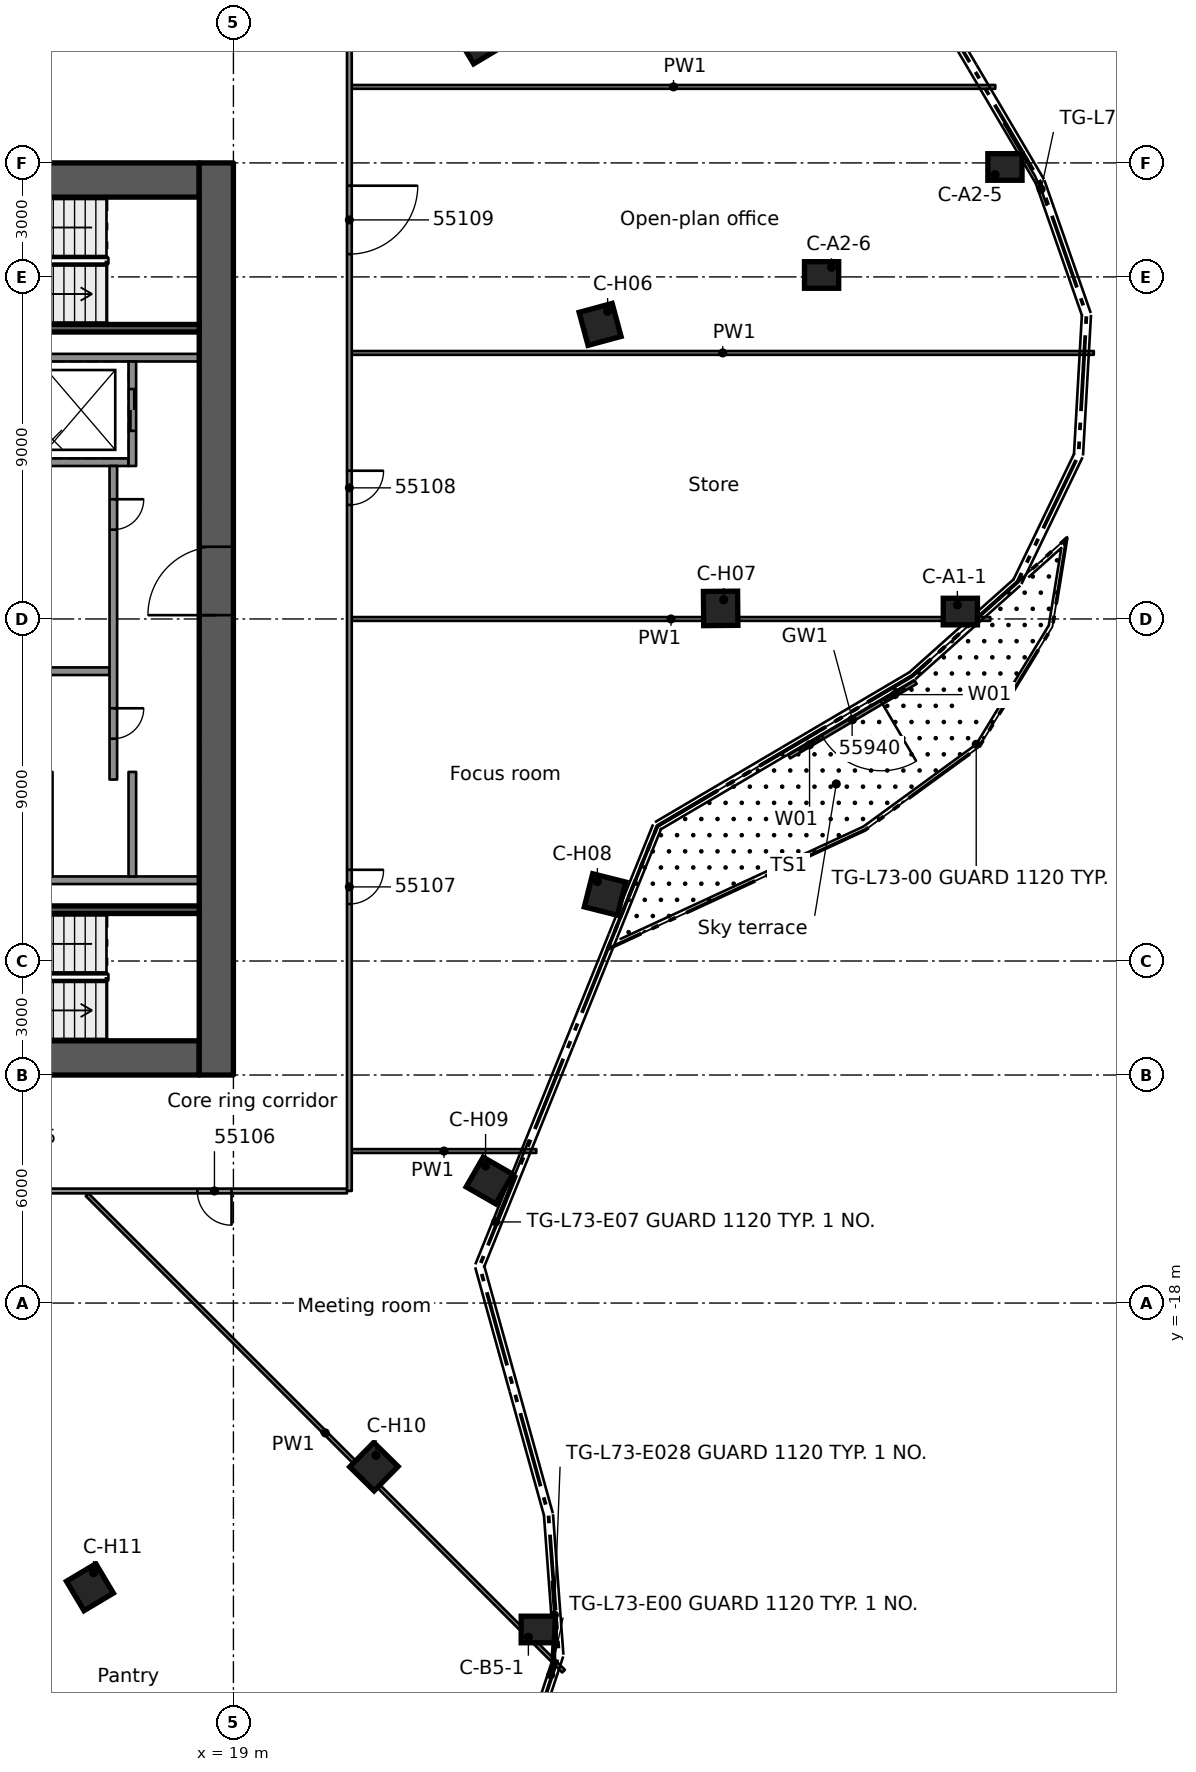
"""IFC4 building model, lengths in metres.
Left out: names, types, materials, properties, quantities, classifications, styles, units other than length and angle.
Written with IfcOpenShell. Run it as: python <this file> out.ifc"""

import sys

from ifc_helpers import new_model, si_unit, direction, frame, frame_2d, origin, origin_2d, place, context, subcontext, project, spatial, rectangle, extrude, element, fill, save


model = new_model("IFC4")
c1 = context("Model", 3, precision=1e-05, world=origin(), true_north=direction((0.0, 1.0)))
c2 = subcontext(c1, "Body", "Model", "MODEL_VIEW")
j1 = project(units=[si_unit("LENGTHUNIT", "METRE"), si_unit("PLANEANGLEUNIT", "RADIAN")], contexts=[c1])
p1 = place(None, origin())
s1 = spatial("IfcSite", under=j1, at=p1, CompositionType="ELEMENT")
p2 = place(p1, origin())
s2 = spatial("IfcBuilding", under=s1, at=p2, CompositionType="ELEMENT")
p3 = place(p2, frame((0.0, 0.0, 275.4)))
s3 = spatial("IfcBuildingStorey", under=s2, at=p3, CompositionType="ELEMENT", Elevation=275.4)
p4 = place(p3, frame((8.9, 11.55, 0.0), z_axis=(0.0, 0.0, 1.0), x_axis=(1.0, 0.0, 0.0)))
e1 = element("IfcWall", 1, at=p4, inside=s3, PredefinedType="SHEAR", context=c2, shape_type="SweptSolid", body=[
    extrude(rectangle(XDim=9.2, YDim=0.9, at=frame_2d((4.6, 0.0))), origin(), (0.0, 0.0, 1.0), 3.5),
])
p5 = place(p4, frame((3.0, 0.0, 0.0)))
e2 = element("IfcOpeningElement", 2, at=p5, cuts=e1, PredefinedType="OPENING", context=c2, shape_type="SweptSolid", body=[
    extrude(rectangle(XDim=1.1, YDim=2.1, at=frame_2d((0.55, 1.05))), frame((0.0, 0.46, 0.0), z_axis=(0.0, -1.0, 0.0), x_axis=(1.0, 0.0, 0.0)), (0.0, 0.0, 1.0), 0.92),
])
p6 = place(p4, frame((0.77, 0.0, 0.0)))
e3 = element("IfcOpeningElement", 3, at=p6, cuts=e1, PredefinedType="OPENING", context=c2, shape_type="SweptSolid", body=[
    extrude(rectangle(XDim=0.9, YDim=2.1, at=frame_2d((0.45, 1.05))), frame((0.0, 0.46, 0.0), z_axis=(0.0, -1.0, 0.0), x_axis=(1.0, 0.0, 0.0)), (0.0, 0.0, 1.0), 0.92),
])
p7 = place(p3, frame((8.9, -11.55, 0.0), z_axis=(0.0, 0.0, 1.0), x_axis=(1.0, 0.0, 0.0)))
e4 = element("IfcWall", 4, at=p7, inside=s3, PredefinedType="SHEAR", context=c2, shape_type="SweptSolid", body=[
    extrude(rectangle(XDim=9.2, YDim=0.9, at=frame_2d((4.6, 0.0))), origin(), (0.0, 0.0, 1.0), 3.5),
])
p8 = place(p7, frame((3.0, 0.0, 0.0)))
e5 = element("IfcOpeningElement", 5, at=p8, cuts=e4, PredefinedType="OPENING", context=c2, shape_type="SweptSolid", body=[
    extrude(rectangle(XDim=1.1, YDim=2.1, at=frame_2d((0.55, 1.05))), frame((0.0, 0.46, 0.0), z_axis=(0.0, -1.0, 0.0), x_axis=(1.0, 0.0, 0.0)), (0.0, 0.0, 1.0), 0.92),
])
p9 = place(p3, frame((18.55, -12.0, 0.0), z_axis=(0.0, 0.0, 1.0), x_axis=(0.0, 1.0, 0.0)))
e6 = element("IfcWall", 6, at=p9, inside=s3, PredefinedType="SHEAR", context=c2, shape_type="SweptSolid", body=[
    extrude(rectangle(XDim=24.0, YDim=0.9, at=frame_2d((12.0, 0.0))), origin(), (0.0, 0.0, 1.0), 3.5),
])
p10 = place(p9, frame((12.1, 0.0, 0.0)))
e7 = element("IfcOpeningElement", 7, at=p10, cuts=e6, PredefinedType="OPENING", context=c2, shape_type="SweptSolid", body=[
    extrude(rectangle(XDim=1.8, YDim=2.1, at=frame_2d((0.9, 1.05))), frame((0.0, 0.46, 0.0), z_axis=(0.0, -1.0, 0.0), x_axis=(1.0, 0.0, 0.0)), (0.0, 0.0, 1.0), 0.92),
])
for number, where, z_axis, x_axis in (
    (8, (38.128, 0.195, 0.0), (0.0, 0.0, 1.0), (1.0, 0.0, 0.0)),
    (9, (39.302, 11.893, 0.0), (0.0, 0.0, 1.0), (1.0, 0.0, 0.0)),
    (10, (34.477, 9.051, 0.0), (0.0, 0.0, 1.0), (1.0, 0.0, 0.0)),
    (11, (27.022, -26.589, 0.0), (0.0, 0.0, 1.0), (1.0, 0.0, 0.0)),
):
    element("IfcColumn", number, at=place(p3, frame(where, z_axis=z_axis, x_axis=x_axis)), inside=s3, PredefinedType="COLUMN", context=c2, shape_type="SweptSolid", body=[
        extrude(rectangle(XDim=0.9, YDim=0.7, at=origin_2d()), origin(), (0.0, 0.0, 1.0), 3.5),
    ])
for number, where, z_axis, x_axis in (
    (12, (25.477, 15.224, 0.0), (0.0, 0.0, 1.0), (0.858, 0.513, 0.0)),
    (13, (28.649, 7.751, 0.0), (0.0, 0.0, 1.0), (0.965, 0.261, 0.0)),
    (14, (31.821, 0.278, 0.0), (0.0, 0.0, 1.0), (1.0, 0.009, 0.0)),
    (15, (28.78, -7.25, 0.0), (0.0, 0.0, 1.0), (0.97, -0.244, 0.0)),
    (16, (25.739, -14.777, 0.0), (0.0, 0.0, 1.0), (0.867, -0.498, 0.0)),
    (17, (22.697, -22.305, 0.0), (0.0, 0.0, 1.0), (0.713, -0.701, 0.0)),
    (18, (15.224, -25.477, 0.0), (0.0, 0.0, 1.0), (0.513, -0.858, 0.0)),
):
    element("IfcColumn", number, at=place(p3, frame(where, z_axis=z_axis, x_axis=x_axis)), inside=s3, PredefinedType="COLUMN", context=c2, shape_type="SweptSolid", body=[
        extrude(rectangle(XDim=0.9, YDim=0.9, at=origin_2d()), origin(), (0.0, 0.0, 1.0), 3.5),
    ])
for number, where, z_axis, x_axis in (
    (19, (11.54, -6.875, 0.0), (0.0, 0.0, 1.0), (1.0, 0.0, 0.0)),
    (20, (11.54, 6.875, 0.0), (0.0, 0.0, 1.0), (1.0, 0.0, 0.0)),
):
    element("IfcWall", number, at=place(p3, frame(where, z_axis=z_axis, x_axis=x_axis)), inside=s3, PredefinedType="SOLIDWALL", context=c2, shape_type="SweptSolid", body=[
        extrude(rectangle(XDim=6.56, YDim=0.2, at=frame_2d((3.28, 0.0))), origin(), (0.0, 0.0, 1.0), 3.09),
    ])
p11 = place(p3, frame((11.54, 4.125, 0.0), z_axis=(0.0, 0.0, 1.0), x_axis=(1.0, 0.0, 0.0)))
e21 = element("IfcWall", 21, at=p11, inside=s3, PredefinedType="SOLIDWALL", context=c2, shape_type="SweptSolid", body=[
    extrude(rectangle(XDim=4.7, YDim=0.2, at=frame_2d((2.35, 0.0))), origin(), (0.0, 0.0, 1.0), 3.09),
])
p12 = place(p3, frame((11.54, -1.375, 0.0), z_axis=(0.0, 0.0, 1.0), x_axis=(1.0, 0.0, 0.0)))
e22 = element("IfcWall", 22, at=p12, inside=s3, PredefinedType="SOLIDWALL", context=c2, shape_type="SweptSolid", body=[
    extrude(rectangle(XDim=4.2, YDim=0.2, at=frame_2d((2.1, 0.0))), origin(), (0.0, 0.0, 1.0), 3.09),
])
p13 = place(p3, frame((14.14, -4.025, 0.0), z_axis=(0.0, 0.0, 1.0), x_axis=(0.0, -1.0, 0.0)))
e23 = element("IfcWall", 23, at=p13, inside=s3, PredefinedType="SOLIDWALL", context=c2, shape_type="SweptSolid", body=[
    extrude(rectangle(XDim=2.75, YDim=0.2, at=frame_2d((1.375, 0.0))), origin(), (0.0, 0.0, 1.0), 3.09),
])
p14 = place(p3, frame((16.34, 6.775, 0.0), z_axis=(0.0, 0.0, 1.0), x_axis=(0.0, -1.0, 0.0)))
e24 = element("IfcWall", 24, at=p14, inside=s3, PredefinedType="SOLIDWALL", context=c2, shape_type="SweptSolid", body=[
    extrude(rectangle(XDim=2.75, YDim=0.2, at=frame_2d((1.375, 0.0))), origin(), (0.0, 0.0, 1.0), 3.09),
])
p15 = place(p14, frame((0.725, 0.0, 0.0)))
e25 = element("IfcOpeningElement", 25, at=p15, cuts=e24, PredefinedType="OPENING", context=c2, shape_type="SweptSolid", body=[
    extrude(rectangle(XDim=1.1, YDim=2.1, at=frame_2d((0.55, 1.05))), frame((0.0, 0.11, 0.0), z_axis=(0.0, -1.0, 0.0), x_axis=(1.0, 0.0, 0.0)), (0.0, 0.0, 1.0), 0.22),
])
p16 = place(p3, frame((15.84, 4.025, 0.0), z_axis=(0.0, 0.0, 1.0), x_axis=(0.0, -1.0, 0.0)))
e26 = element("IfcWall", 26, at=p16, inside=s3, PredefinedType="SOLIDWALL", context=c2, shape_type="SweptSolid", body=[
    extrude(rectangle(XDim=8.25, YDim=0.2, at=frame_2d((4.125, 0.0))), origin(), (0.0, 0.0, 1.0), 3.09),
])
p17 = place(p16, frame((0.875, 0.0, 0.0)))
e27 = element("IfcOpeningElement", 27, at=p17, cuts=e26, PredefinedType="OPENING", context=c2, shape_type="SweptSolid", body=[
    extrude(rectangle(XDim=0.8, YDim=2.1, at=frame_2d((0.4, 1.05))), frame((0.0, 0.11, 0.0), z_axis=(0.0, -1.0, 0.0), x_axis=(1.0, 0.0, 0.0)), (0.0, 0.0, 1.0), 0.22),
])
p18 = place(p16, frame((6.375, 0.0, 0.0)))
e28 = element("IfcOpeningElement", 28, at=p18, cuts=e26, PredefinedType="OPENING", context=c2, shape_type="SweptSolid", body=[
    extrude(rectangle(XDim=0.8, YDim=2.1, at=frame_2d((0.4, 1.05))), frame((0.0, 0.11, 0.0), z_axis=(0.0, -1.0, 0.0), x_axis=(1.0, 0.0, 0.0)), (0.0, 0.0, 1.0), 0.22),
])
p19 = place(p3, frame((16.34, -4.025, 0.0), z_axis=(0.0, 0.0, 1.0), x_axis=(0.0, -1.0, 0.0)))
e29 = element("IfcWall", 29, at=p19, inside=s3, PredefinedType="SOLIDWALL", context=c2, shape_type="SweptSolid", body=[
    extrude(rectangle(XDim=2.75, YDim=0.2, at=frame_2d((1.375, 0.0))), origin(), (0.0, 0.0, 1.0), 3.09),
])
for number, where, z_axis, x_axis in (
    (30, (11.54, -7.65, 0.0), (0.0, 0.0, 1.0), (1.0, 0.0, 0.0)),
    (31, (11.54, 7.65, 0.0), (0.0, 0.0, 1.0), (1.0, 0.0, 0.0)),
):
    element("IfcWall", number, at=place(p3, frame(where, z_axis=z_axis, x_axis=x_axis)), inside=s3, PredefinedType="SOLIDWALL", context=c2, shape_type="SweptSolid", body=[
        extrude(rectangle(XDim=6.56, YDim=0.2, at=frame_2d((3.28, 0.0))), origin(), (0.0, 0.0, 1.0), 3.09),
    ])
p20 = place(p3, frame((36.955, -1.664, 0.0), z_axis=(0.0, 0.0, 1.0), x_axis=(-0.861607547151, -0.507575053261, 0.0)))
e32 = element("IfcWall", 32, at=p20, inside=s3, PredefinedType="STANDARD", context=c2, shape_type="SweptSolid", body=[
    extrude(rectangle(XDim=3.864, YDim=0.1, at=frame_2d((1.932, 0.0))), origin(), (0.0, 0.0, 1.0), 3.1),
])
p21 = place(p20, frame((1.043, 0.0, 0.0)))
e33 = element("IfcOpeningElement", 33, at=p21, cuts=e32, PredefinedType="OPENING", context=c2, shape_type="SweptSolid", body=[
    extrude(rectangle(XDim=1.8, YDim=2.4, at=frame_2d((0.9, 1.2))), frame((0.0, 0.06, 0.0), z_axis=(0.0, -1.0, 0.0), x_axis=(1.0, 0.0, 0.0)), (0.0, 0.0, 1.0), 0.12),
])
p22 = place(p20, frame((0.343, 0.0, 0.0)))
e34 = element("IfcOpeningElement", 34, at=p22, cuts=e32, PredefinedType="OPENING", context=c2, shape_type="SweptSolid", body=[
    extrude(rectangle(XDim=0.6, YDim=2.4, at=frame_2d((0.3, 1.2))), frame((0.0, 0.06, 0.0), z_axis=(0.0, -1.0, 0.0), x_axis=(1.0, 0.0, 0.0)), (0.0, 0.0, 1.0), 0.12),
])
p23 = place(p20, frame((2.943, 0.0, 0.0)))
e35 = element("IfcOpeningElement", 35, at=p23, cuts=e32, PredefinedType="OPENING", context=c2, shape_type="SweptSolid", body=[
    extrude(rectangle(XDim=0.6, YDim=2.4, at=frame_2d((0.3, 1.2))), frame((0.0, 0.06, 0.0), z_axis=(0.0, -1.0, 0.0), x_axis=(1.0, 0.0, 0.0)), (0.0, 0.0, 1.0), 0.12),
])
p24 = place(p3, frame((15.15, -15.149, 0.0), z_axis=(0.0, 0.0, 1.0), x_axis=(0.707106781187, -0.707106781187, 0.0)))
e36 = element("IfcWall", 36, at=p24, inside=s3, PredefinedType="PARTITIONING", context=c2, shape_type="SweptSolid", body=[
    extrude(rectangle(XDim=17.73, YDim=0.1, at=frame_2d((8.865, 0.0))), origin(), (0.0, 0.0, 1.0), 3.08),
])
p25 = place(p3, frame((21.988, -15.051, 0.0), z_axis=(0.0, 0.0, 1.0), x_axis=(-1.0, 0.0, 0.0)))
e37 = element("IfcWall", 37, at=p25, inside=s3, PredefinedType="PARTITIONING", context=c2, shape_type="SweptSolid", body=[
    extrude(rectangle(XDim=11.638, YDim=0.125, at=frame_2d((5.819, 0.0))), origin(), (0.0, 0.0, 1.0), 3.08),
])
p26 = place(p25, frame((8.785, 0.0, 0.0)))
e38 = element("IfcOpeningElement", 38, at=p26, cuts=e37, PredefinedType="OPENING", context=c2, shape_type="SweptSolid", body=[
    extrude(rectangle(XDim=0.9, YDim=2.1, at=frame_2d((0.45, 1.05))), frame((0.0, 0.073, 0.0), z_axis=(0.0, -1.0, 0.0), x_axis=(1.0, 0.0, 0.0)), (0.0, 0.0, 1.0), 0.145),
])
p27 = place(p25, frame((3.038, 0.0, 0.0)))
e39 = element("IfcOpeningElement", 39, at=p27, cuts=e37, PredefinedType="OPENING", context=c2, shape_type="SweptSolid", body=[
    extrude(rectangle(XDim=0.9, YDim=2.1, at=frame_2d((0.45, 1.05))), frame((0.0, 0.073, 0.0), z_axis=(0.0, -1.0, 0.0), x_axis=(1.0, 0.0, 0.0)), (0.0, 0.0, 1.0), 0.145),
])
p28 = place(p3, frame((22.113, -14.0, 0.0), z_axis=(0.0, 0.0, 1.0), x_axis=(1.0, 0.0, 0.0)))
e40 = element("IfcWall", 40, at=p28, inside=s3, PredefinedType="PARTITIONING", context=c2, shape_type="SweptSolid", body=[
    extrude(rectangle(XDim=4.857, YDim=0.1, at=frame_2d((2.428, 0.0))), origin(), (0.0, 0.0, 1.0), 3.08),
])
p29 = place(p3, frame((22.113, 0.0, 0.0), z_axis=(0.0, 0.0, 1.0), x_axis=(1.0, 0.0, 0.0)))
e41 = element("IfcWall", 41, at=p29, inside=s3, PredefinedType="PARTITIONING", context=c2, shape_type="SweptSolid", body=[
    extrude(rectangle(XDim=16.803, YDim=0.1, at=frame_2d((8.401, 0.0))), origin(), (0.0, 0.0, 1.0), 3.08),
])
p30 = place(p3, frame((22.113, 7.0, 0.0), z_axis=(0.0, 0.0, 1.0), x_axis=(1.0, 0.0, 0.0)))
e42 = element("IfcWall", 42, at=p30, inside=s3, PredefinedType="PARTITIONING", context=c2, shape_type="SweptSolid", body=[
    extrude(rectangle(XDim=19.527, YDim=0.1, at=frame_2d((9.763, 0.0))), origin(), (0.0, 0.0, 1.0), 3.08),
])
p31 = place(p3, frame((22.113, 14.0, 0.0), z_axis=(0.0, 0.0, 1.0), x_axis=(1.0, 0.0, 0.0)))
e43 = element("IfcWall", 43, at=p31, inside=s3, PredefinedType="PARTITIONING", context=c2, shape_type="SweptSolid", body=[
    extrude(rectangle(XDim=16.935, YDim=0.1, at=frame_2d((8.468, 0.0))), origin(), (0.0, 0.0, 1.0), 3.08),
])
p32 = place(p3, frame((22.051, 15.05, 0.0), z_axis=(0.0, 0.0, 1.0), x_axis=(0.0, -1.0, 0.0)))
e44 = element("IfcWall", 44, at=p32, inside=s3, PredefinedType="PARTITIONING", context=c2, shape_type="SweptSolid", body=[
    extrude(rectangle(XDim=30.1, YDim=0.125, at=frame_2d((15.05, 0.0))), origin(), (0.0, 0.0, 1.0), 3.08),
])
p33 = place(p32, frame((21.65, 0.0, 0.0)))
e45 = element("IfcOpeningElement", 45, at=p33, cuts=e44, PredefinedType="OPENING", context=c2, shape_type="SweptSolid", body=[
    extrude(rectangle(XDim=0.9, YDim=2.1, at=frame_2d((0.45, 1.05))), frame((0.0, 0.073, 0.0), z_axis=(0.0, -1.0, 0.0), x_axis=(1.0, 0.0, 0.0)), (0.0, 0.0, 1.0), 0.145),
])
p34 = place(p32, frame((11.15, 0.0, 0.0)))
e46 = element("IfcOpeningElement", 46, at=p34, cuts=e44, PredefinedType="OPENING", context=c2, shape_type="SweptSolid", body=[
    extrude(rectangle(XDim=0.9, YDim=2.1, at=frame_2d((0.45, 1.05))), frame((0.0, 0.073, 0.0), z_axis=(0.0, -1.0, 0.0), x_axis=(1.0, 0.0, 0.0)), (0.0, 0.0, 1.0), 0.145),
])
p35 = place(p32, frame((3.65, 0.0, 0.0)))
e47 = element("IfcOpeningElement", 47, at=p35, cuts=e44, PredefinedType="OPENING", context=c2, shape_type="SweptSolid", body=[
    extrude(rectangle(XDim=1.8, YDim=2.1, at=frame_2d((0.9, 1.05))), frame((0.0, 0.073, 0.0), z_axis=(0.0, -1.0, 0.0), x_axis=(1.0, 0.0, 0.0)), (0.0, 0.0, 1.0), 0.145),
])
p36 = place(p15, origin())
e48 = element("IfcDoor", 48, at=p36, inside=s3, OperationType="DOUBLE_DOOR_SLIDING", PredefinedType="DOOR", context=c2, shape_type="SweptSolid", body=[
    extrude(rectangle(XDim=1.1, YDim=2.1, at=frame_2d((0.55, 1.05))), frame((0.0, 0.025, 0.0), z_axis=(0.0, -1.0, 0.0), x_axis=(1.0, 0.0, 0.0)), (0.0, 0.0, 1.0), 0.05),
])
fill(e25, e48)
p37 = place(p17, origin())
e49 = element("IfcDoor", 49, at=p37, inside=s3, OperationType="SINGLE_SWING_LEFT", PredefinedType="DOOR", context=c2, shape_type="SweptSolid", body=[
    extrude(rectangle(XDim=0.8, YDim=2.1, at=frame_2d((0.4, 1.05))), frame((0.0, 0.025, 0.0), z_axis=(0.0, -1.0, 0.0), x_axis=(1.0, 0.0, 0.0)), (0.0, 0.0, 1.0), 0.05),
])
fill(e27, e49)
p38 = place(p18, origin())
e50 = element("IfcDoor", 50, at=p38, inside=s3, OperationType="SINGLE_SWING_LEFT", PredefinedType="DOOR", context=c2, shape_type="SweptSolid", body=[
    extrude(rectangle(XDim=0.8, YDim=2.1, at=frame_2d((0.4, 1.05))), frame((0.0, 0.025, 0.0), z_axis=(0.0, -1.0, 0.0), x_axis=(1.0, 0.0, 0.0)), (0.0, 0.0, 1.0), 0.05),
])
fill(e28, e50)
p39 = place(p10, origin())
e51 = element("IfcDoor", 51, at=p39, inside=s3, OperationType="SINGLE_SWING_RIGHT", PredefinedType="DOOR", context=c2, shape_type="SweptSolid", body=[
    extrude(rectangle(XDim=1.8, YDim=2.1, at=frame_2d((0.9, 1.05))), frame((0.0, 0.025, 0.0), z_axis=(0.0, -1.0, 0.0), x_axis=(1.0, 0.0, 0.0)), (0.0, 0.0, 1.0), 0.05),
])
fill(e7, e51)
p40 = place(p21, origin())
e52 = element("IfcDoor", 52, at=p40, inside=s3, OperationType="DOUBLE_DOOR_SINGLE_SWING", PredefinedType="DOOR", context=c2, shape_type="SweptSolid", body=[
    extrude(rectangle(XDim=1.8, YDim=2.4, at=frame_2d((0.9, 1.2))), frame((0.0, 0.025, 0.0), z_axis=(0.0, -1.0, 0.0), x_axis=(1.0, 0.0, 0.0)), (0.0, 0.0, 1.0), 0.05),
])
fill(e33, e52)
p41 = place(p22, origin())
e53 = element("IfcWindow", 53, at=p41, inside=s3, PartitioningType="SINGLE_PANEL", PredefinedType="WINDOW", context=c2, shape_type="SweptSolid", body=[
    extrude(rectangle(XDim=0.6, YDim=2.4, at=frame_2d((0.3, 1.2))), frame((0.0, 0.03, 0.0), z_axis=(0.0, -1.0, 0.0), x_axis=(1.0, 0.0, 0.0)), (0.0, 0.0, 1.0), 0.06),
])
fill(e34, e53)
p42 = place(p23, origin())
e54 = element("IfcWindow", 54, at=p42, inside=s3, PartitioningType="SINGLE_PANEL", PredefinedType="WINDOW", context=c2, shape_type="SweptSolid", body=[
    extrude(rectangle(XDim=0.6, YDim=2.4, at=frame_2d((0.3, 1.2))), frame((0.0, 0.03, 0.0), z_axis=(0.0, -1.0, 0.0), x_axis=(1.0, 0.0, 0.0)), (0.0, 0.0, 1.0), 0.06),
])
fill(e35, e54)
p43 = place(p27, origin())
e55 = element("IfcDoor", 55, at=p43, inside=s3, OperationType="SINGLE_SWING_LEFT", PredefinedType="DOOR", context=c2, shape_type="SweptSolid", body=[
    extrude(rectangle(XDim=0.9, YDim=2.1, at=frame_2d((0.45, 1.05))), frame((0.0, 0.025, 0.0), z_axis=(0.0, -1.0, 0.0), x_axis=(1.0, 0.0, 0.0)), (0.0, 0.0, 1.0), 0.05),
])
fill(e39, e55)
p44 = place(p33, origin())
e56 = element("IfcDoor", 56, at=p44, inside=s3, OperationType="SINGLE_SWING_RIGHT", PredefinedType="DOOR", context=c2, shape_type="SweptSolid", body=[
    extrude(rectangle(XDim=0.9, YDim=2.1, at=frame_2d((0.45, 1.05))), frame((0.0, 0.025, 0.0), z_axis=(0.0, -1.0, 0.0), x_axis=(1.0, 0.0, 0.0)), (0.0, 0.0, 1.0), 0.05),
])
fill(e45, e56)
p45 = place(p34, origin())
e57 = element("IfcDoor", 57, at=p45, inside=s3, OperationType="SINGLE_SWING_LEFT", PredefinedType="DOOR", context=c2, shape_type="SweptSolid", body=[
    extrude(rectangle(XDim=0.9, YDim=2.1, at=frame_2d((0.45, 1.05))), frame((0.0, 0.025, 0.0), z_axis=(0.0, -1.0, 0.0), x_axis=(1.0, 0.0, 0.0)), (0.0, 0.0, 1.0), 0.05),
])
fill(e46, e57)
p46 = place(p35, origin())
e58 = element("IfcDoor", 58, at=p46, inside=s3, OperationType="DOUBLE_DOOR_SINGLE_SWING", PredefinedType="DOOR", context=c2, shape_type="SweptSolid", body=[
    extrude(rectangle(XDim=1.8, YDim=2.1, at=frame_2d((0.9, 1.05))), frame((0.0, 0.025, 0.0), z_axis=(0.0, -1.0, 0.0), x_axis=(1.0, 0.0, 0.0)), (0.0, 0.0, 1.0), 0.05),
])
fill(e47, e58)
save(model, sys.argv[1])
